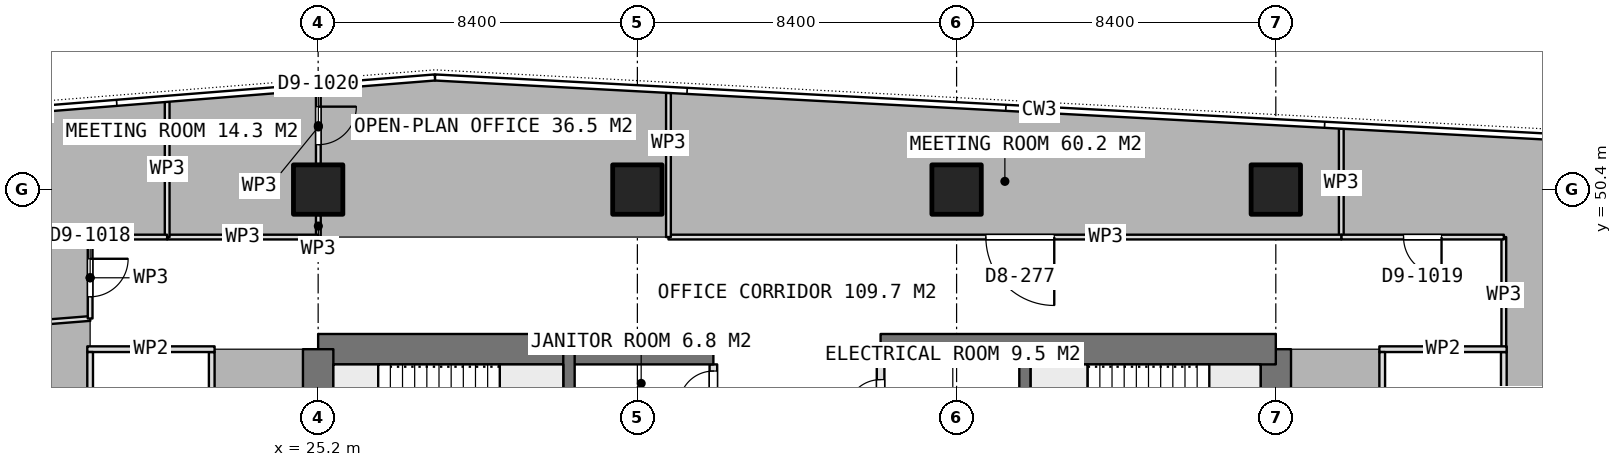
"""IFC4 building model, lengths in metres.
Left out: names, types, materials, properties, quantities, classifications, styles, units other than length and angle.
Written with IfcOpenShell. Run it as: python <this file> out.ifc"""

import sys

from ifc_helpers import new_model, si_unit, direction, frame, frame_2d, origin, origin_2d, place, context, subcontext, project, spatial, rectangle, extrude, element, fill, save


model = new_model("IFC4")
c1 = context("Model", 3, precision=1e-05, world=origin(), true_north=direction((0.0, 1.0)))
c2 = subcontext(c1, "Body", "Model", "MODEL_VIEW")
j1 = project(units=[si_unit("LENGTHUNIT", "METRE"), si_unit("PLANEANGLEUNIT", "RADIAN")], contexts=[c1])
p1 = place(None, origin())
s1 = spatial("IfcSite", under=j1, at=p1, CompositionType="ELEMENT")
p2 = place(p1, origin())
s2 = spatial("IfcBuilding", under=s1, at=p2, CompositionType="ELEMENT")
p3 = place(p2, frame((0.0, 0.0, 272.6)))
s3 = spatial("IfcBuildingStorey", under=s2, at=p3, CompositionType="ELEMENT", Elevation=272.6)
p4 = place(p3, frame((25.2, 46.2, 0.0), z_axis=(0.0, 0.0, 1.0), x_axis=(1.0, 0.0, 0.0)))
e1 = element("IfcWall", 1, at=p4, inside=s3, PredefinedType="SHEAR", context=c2, shape_type="SweptSolid", body=[
    extrude(rectangle(XDim=10.4, YDim=0.8, at=frame_2d((5.2, 0.0))), origin(), (0.0, 0.0, 1.0), 3.75),
])
p5 = place(p3, frame((40.0, 46.2, 0.0), z_axis=(0.0, 0.0, 1.0), x_axis=(1.0, 0.0, 0.0)))
e2 = element("IfcWall", 2, at=p5, inside=s3, PredefinedType="SHEAR", context=c2, shape_type="SweptSolid", body=[
    extrude(rectangle(XDim=10.4, YDim=0.8, at=frame_2d((5.2, 0.0))), origin(), (0.0, 0.0, 1.0), 3.75),
])
p6 = place(p3, frame((25.2, 21.0, 0.0), z_axis=(0.0, 0.0, 1.0), x_axis=(0.0, 1.0, 0.0)))
e3 = element("IfcWall", 3, at=p6, inside=s3, PredefinedType="SHEAR", context=c2, shape_type="SweptSolid", body=[
    extrude(rectangle(XDim=25.2, YDim=0.8, at=frame_2d((12.6, 0.0))), origin(), (0.0, 0.0, 1.0), 3.75),
])
p7 = place(p6, frame((7.8, 0.0, 0.0)))
e4 = element("IfcOpeningElement", 4, at=p7, cuts=e3, PredefinedType="OPENING", context=c2, shape_type="SweptSolid", body=[
    extrude(rectangle(XDim=1.2, YDim=2.1, at=frame_2d((0.6, 1.05))), frame((0.0, 0.41, 0.0), z_axis=(0.0, -1.0, 0.0), x_axis=(1.0, 0.0, 0.0)), (0.0, 0.0, 1.0), 0.82),
])
p8 = place(p6, frame((14.25, 0.0, 0.0)))
e5 = element("IfcOpeningElement", 5, at=p8, cuts=e3, PredefinedType="OPENING", context=c2, shape_type="SweptSolid", body=[
    extrude(rectangle(XDim=0.9, YDim=2.1, at=frame_2d((0.45, 1.05))), frame((0.0, 0.41, 0.0), z_axis=(0.0, -1.0, 0.0), x_axis=(1.0, 0.0, 0.0)), (0.0, 0.0, 1.0), 0.82),
])
p9 = place(p6, frame((16.85, 0.0, 0.0)))
e6 = element("IfcOpeningElement", 6, at=p9, cuts=e3, PredefinedType="OPENING", context=c2, shape_type="SweptSolid", body=[
    extrude(rectangle(XDim=0.9, YDim=2.1, at=frame_2d((0.45, 1.05))), frame((0.0, 0.41, 0.0), z_axis=(0.0, -1.0, 0.0), x_axis=(1.0, 0.0, 0.0)), (0.0, 0.0, 1.0), 0.82),
])
p10 = place(p6, frame((18.95, 0.0, 0.0)))
e7 = element("IfcOpeningElement", 7, at=p10, cuts=e3, PredefinedType="OPENING", context=c2, shape_type="SweptSolid", body=[
    extrude(rectangle(XDim=1.2, YDim=2.1, at=frame_2d((0.6, 1.05))), frame((0.0, 0.41, 0.0), z_axis=(0.0, -1.0, 0.0), x_axis=(1.0, 0.0, 0.0)), (0.0, 0.0, 1.0), 0.82),
])
p11 = place(p3, frame((50.4, 21.0, 0.0), z_axis=(0.0, 0.0, 1.0), x_axis=(0.0, 1.0, 0.0)))
e8 = element("IfcWall", 8, at=p11, inside=s3, PredefinedType="SHEAR", context=c2, shape_type="SweptSolid", body=[
    extrude(rectangle(XDim=25.2, YDim=0.8, at=frame_2d((12.6, 0.0))), origin(), (0.0, 0.0, 1.0), 3.75),
])
p12 = place(p11, frame((16.2, 0.0, 0.0)))
e9 = element("IfcOpeningElement", 9, at=p12, cuts=e8, PredefinedType="OPENING", context=c2, shape_type="SweptSolid", body=[
    extrude(rectangle(XDim=1.2, YDim=2.1, at=frame_2d((0.6, 1.05))), frame((0.0, 0.41, 0.0), z_axis=(0.0, -1.0, 0.0), x_axis=(1.0, 0.0, 0.0)), (0.0, 0.0, 1.0), 0.82),
])
p13 = place(p11, frame((10.05, 0.0, 0.0)))
e10 = element("IfcOpeningElement", 10, at=p13, cuts=e8, PredefinedType="OPENING", context=c2, shape_type="SweptSolid", body=[
    extrude(rectangle(XDim=0.9, YDim=2.1, at=frame_2d((0.45, 1.05))), frame((0.0, 0.41, 0.0), z_axis=(0.0, -1.0, 0.0), x_axis=(1.0, 0.0, 0.0)), (0.0, 0.0, 1.0), 0.82),
])
p14 = place(p11, frame((7.45, 0.0, 0.0)))
e11 = element("IfcOpeningElement", 11, at=p14, cuts=e8, PredefinedType="OPENING", context=c2, shape_type="SweptSolid", body=[
    extrude(rectangle(XDim=0.9, YDim=2.1, at=frame_2d((0.45, 1.05))), frame((0.0, 0.41, 0.0), z_axis=(0.0, -1.0, 0.0), x_axis=(1.0, 0.0, 0.0)), (0.0, 0.0, 1.0), 0.82),
])
p15 = place(p11, frame((0.6, 0.0, 0.0)))
e12 = element("IfcOpeningElement", 12, at=p15, cuts=e8, PredefinedType="OPENING", context=c2, shape_type="SweptSolid", body=[
    extrude(rectangle(XDim=1.2, YDim=2.1, at=frame_2d((0.6, 1.05))), frame((0.0, 0.41, 0.0), z_axis=(0.0, -1.0, 0.0), x_axis=(1.0, 0.0, 0.0)), (0.0, 0.0, 1.0), 0.82),
])
for number, where, z_axis, x_axis in (
    (13, (31.8, 21.0, 0.0), (0.0, 0.0, 1.0), (0.0, 1.0, 0.0)),
    (14, (43.8, 21.0, 0.0), (0.0, 0.0, 1.0), (0.0, 1.0, 0.0)),
):
    element("IfcWall", number, at=place(p3, frame(where, z_axis=z_axis, x_axis=x_axis)), inside=s3, PredefinedType="SHEAR", context=c2, shape_type="SweptSolid", body=[
        extrude(rectangle(XDim=25.2, YDim=0.3, at=frame_2d((12.6, 0.0))), origin(), (0.0, 0.0, 1.0), 3.75),
    ])
for number, where, z_axis, x_axis in (
    (15, (25.2, 50.4, 0.0), (0.0, 0.0, 1.0), (1.0, 0.0, 0.0)),
    (16, (33.6, 50.4, 0.0), (0.0, 0.0, 1.0), (1.0, 0.0, 0.0)),
    (17, (42.0, 50.4, 0.0), (0.0, 0.0, 1.0), (1.0, 0.0, 0.0)),
    (18, (50.4, 50.4, 0.0), (0.0, 0.0, 1.0), (1.0, 0.0, 0.0)),
):
    element("IfcColumn", number, at=place(p3, frame(where, z_axis=z_axis, x_axis=x_axis)), inside=s3, PredefinedType="COLUMN", context=c2, shape_type="SweptSolid", body=[
        extrude(rectangle(XDim=1.3, YDim=1.3, at=origin_2d()), origin(), (0.0, 0.0, 1.0), 3.75),
    ])
p16 = place(p3, frame((40.0, 41.55, 0.0), z_axis=(0.0, 0.0, 1.0), x_axis=(0.0, 1.0, 0.0)))
e19 = element("IfcWall", 19, at=p16, inside=s3, PredefinedType="PARTITIONING", context=c2, shape_type="SweptSolid", body=[
    extrude(rectangle(XDim=4.25, YDim=0.2, at=frame_2d((2.125, 0.0))), origin(), (0.0, 0.0, 1.0), 3.5),
])
p17 = place(p16, frame((2.95, 0.0, 0.0)))
e20 = element("IfcOpeningElement", 20, at=p17, cuts=e19, PredefinedType="OPENING", context=c2, shape_type="SweptSolid", body=[
    extrude(rectangle(XDim=0.9, YDim=2.1, at=frame_2d((0.45, 1.05))), frame((0.0, 0.11, 0.0), z_axis=(0.0, -1.0, 0.0), x_axis=(1.0, 0.0, 0.0)), (0.0, 0.0, 1.0), 0.22),
])
p18 = place(p16, frame((0.5, 0.0, 0.0)))
e21 = element("IfcOpeningElement", 21, at=p18, cuts=e19, PredefinedType="OPENING", context=c2, shape_type="SweptSolid", body=[
    extrude(rectangle(XDim=1.0, YDim=2.1, at=frame_2d((0.5, 1.05))), frame((0.0, 0.11, 0.0), z_axis=(0.0, -1.0, 0.0), x_axis=(1.0, 0.0, 0.0)), (0.0, 0.0, 1.0), 0.22),
])
p19 = place(p3, frame((35.6, 41.55, 0.0), z_axis=(0.0, 0.0, 1.0), x_axis=(0.0, 1.0, 0.0)))
e22 = element("IfcWall", 22, at=p19, inside=s3, PredefinedType="PARTITIONING", context=c2, shape_type="SweptSolid", body=[
    extrude(rectangle(XDim=4.25, YDim=0.2, at=frame_2d((2.125, 0.0))), origin(), (0.0, 0.0, 1.0), 3.5),
])
p20 = place(p19, frame((3.175, 0.0, 0.0)))
e23 = element("IfcOpeningElement", 23, at=p20, cuts=e22, PredefinedType="OPENING", context=c2, shape_type="SweptSolid", body=[
    extrude(rectangle(XDim=0.9, YDim=2.1, at=frame_2d((0.45, 1.05))), frame((0.0, 0.11, 0.0), z_axis=(0.0, -1.0, 0.0), x_axis=(1.0, 0.0, 0.0)), (0.0, 0.0, 1.0), 0.22),
])
p21 = place(p19, frame((0.8, 0.0, 0.0)))
e24 = element("IfcOpeningElement", 24, at=p21, cuts=e22, PredefinedType="OPENING", context=c2, shape_type="SweptSolid", body=[
    extrude(rectangle(XDim=1.1, YDim=2.1, at=frame_2d((0.55, 1.05))), frame((0.0, 0.11, 0.0), z_axis=(0.0, -1.0, 0.0), x_axis=(1.0, 0.0, 0.0)), (0.0, 0.0, 1.0), 0.22),
])
p22 = place(p3, frame((53.125, 46.2, 0.0), z_axis=(0.0, 0.0, 1.0), x_axis=(1.0, 0.0, 0.0)))
e25 = element("IfcWall", 25, at=p22, inside=s3, PredefinedType="PARTITIONING", context=c2, shape_type="SweptSolid", body=[
    extrude(rectangle(XDim=3.35, YDim=0.15, at=frame_2d((1.675, 0.0))), origin(), (0.0, 0.0, 1.0), 3.5),
])
p23 = place(p3, frame((53.2, 39.275, 0.0), z_axis=(0.0, 0.0, 1.0), x_axis=(0.0, 1.0, 0.0)))
e26 = element("IfcWall", 26, at=p23, inside=s3, PredefinedType="PARTITIONING", context=c2, shape_type="SweptSolid", body=[
    extrude(rectangle(XDim=6.85, YDim=0.15, at=frame_2d((3.425, 0.0))), origin(), (0.0, 0.0, 1.0), 3.5),
])
p24 = place(p23, frame((2.925, 0.0, 0.0)))
e27 = element("IfcOpeningElement", 27, at=p24, cuts=e26, PredefinedType="OPENING", context=c2, shape_type="SweptSolid", body=[
    extrude(rectangle(XDim=1.0, YDim=2.1, at=frame_2d((0.5, 1.05))), frame((0.0, 0.085, 0.0), z_axis=(0.0, -1.0, 0.0), x_axis=(1.0, 0.0, 0.0)), (0.0, 0.0, 1.0), 0.17),
])
p25 = place(p3, frame((56.4, 39.275, 0.0), z_axis=(0.0, 0.0, 1.0), x_axis=(0.0, 1.0, 0.0)))
e28 = element("IfcWall", 28, at=p25, inside=s3, PredefinedType="PARTITIONING", context=c2, shape_type="SweptSolid", body=[
    extrude(rectangle(XDim=6.85, YDim=0.15, at=frame_2d((3.425, 0.0))), origin(), (0.0, 0.0, 1.0), 3.5),
])
p26 = place(p3, frame((19.125, 46.2, 0.0), z_axis=(0.0, 0.0, 1.0), x_axis=(1.0, 0.0, 0.0)))
e29 = element("IfcWall", 29, at=p26, inside=s3, PredefinedType="PARTITIONING", context=c2, shape_type="SweptSolid", body=[
    extrude(rectangle(XDim=3.35, YDim=0.15, at=frame_2d((1.675, 0.0))), origin(), (0.0, 0.0, 1.0), 3.5),
])
p27 = place(p3, frame((19.2, 39.275, 0.0), z_axis=(0.0, 0.0, 1.0), x_axis=(0.0, 1.0, 0.0)))
e30 = element("IfcWall", 30, at=p27, inside=s3, PredefinedType="PARTITIONING", context=c2, shape_type="SweptSolid", body=[
    extrude(rectangle(XDim=6.85, YDim=0.15, at=frame_2d((3.425, 0.0))), origin(), (0.0, 0.0, 1.0), 3.5),
])
p28 = place(p3, frame((22.4, 39.275, 0.0), z_axis=(0.0, 0.0, 1.0), x_axis=(0.0, 1.0, 0.0)))
e31 = element("IfcWall", 31, at=p28, inside=s3, PredefinedType="PARTITIONING", context=c2, shape_type="SweptSolid", body=[
    extrude(rectangle(XDim=6.85, YDim=0.15, at=frame_2d((3.425, 0.0))), origin(), (0.0, 0.0, 1.0), 3.5),
])
p29 = place(p28, frame((2.925, 0.0, 0.0)))
e32 = element("IfcOpeningElement", 32, at=p29, cuts=e31, PredefinedType="OPENING", context=c2, shape_type="SweptSolid", body=[
    extrude(rectangle(XDim=1.0, YDim=2.1, at=frame_2d((0.5, 1.05))), frame((0.0, 0.085, 0.0), z_axis=(0.0, -1.0, 0.0), x_axis=(1.0, 0.0, 0.0)), (0.0, 0.0, 1.0), 0.17),
])
p30 = place(p3, frame((52.123, 49.15, 0.0), z_axis=(0.0, 0.0, 1.0), x_axis=(0.0, 1.0, 0.0)))
e33 = element("IfcWall", 33, at=p30, inside=s3, PredefinedType="PARTITIONING", context=c2, shape_type="SweptSolid", body=[
    extrude(rectangle(XDim=2.852, YDim=0.125, at=frame_2d((1.426, 0.0))), origin(), (0.0, 0.0, 1.0), 3.5),
])
p31 = place(p3, frame((56.4, 46.125, 0.0), z_axis=(0.0, 0.0, 1.0), x_axis=(0.0, 1.0, 0.0)))
e34 = element("IfcWall", 34, at=p31, inside=s3, PredefinedType="PARTITIONING", context=c2, shape_type="SweptSolid", body=[
    extrude(rectangle(XDim=3.025, YDim=0.125, at=frame_2d((1.512, 0.0))), origin(), (0.0, 0.0, 1.0), 3.5),
])
p32 = place(p3, frame((56.4, 49.15, 0.0), z_axis=(0.0, 0.0, 1.0), x_axis=(-1.0, 0.0, 0.0)))
e35 = element("IfcWall", 35, at=p32, inside=s3, PredefinedType="PARTITIONING", context=c2, shape_type="SweptSolid", body=[
    extrude(rectangle(XDim=4.277, YDim=0.125, at=frame_2d((2.138, 0.0))), origin(), (0.0, 0.0, 1.0), 3.5),
])
p33 = place(p32, frame((1.639, 0.0, 0.0)))
e36 = element("IfcOpeningElement", 36, at=p33, cuts=e35, PredefinedType="OPENING", context=c2, shape_type="SweptSolid", body=[
    extrude(rectangle(XDim=1.0, YDim=2.1, at=frame_2d((0.5, 1.05))), frame((0.0, 0.073, 0.0), z_axis=(0.0, -1.0, 0.0), x_axis=(1.0, 0.0, 0.0)), (0.0, 0.0, 1.0), 0.145),
])
p34 = place(p3, frame((52.123, 49.15, 0.0), z_axis=(0.0, 0.0, 1.0), x_axis=(-1.0, 0.0, 0.0)))
e37 = element("IfcWall", 37, at=p34, inside=s3, PredefinedType="PARTITIONING", context=c2, shape_type="SweptSolid", body=[
    extrude(rectangle(XDim=17.705, YDim=0.125, at=frame_2d((8.853, 0.0))), origin(), (0.0, 0.0, 1.0), 3.5),
])
p35 = place(p34, frame((7.553, 0.0, 0.0)))
e38 = element("IfcOpeningElement", 38, at=p35, cuts=e37, PredefinedType="OPENING", context=c2, shape_type="SweptSolid", body=[
    extrude(rectangle(XDim=1.8, YDim=2.1, at=frame_2d((0.9, 1.05))), frame((0.0, 0.073, 0.0), z_axis=(0.0, -1.0, 0.0), x_axis=(1.0, 0.0, 0.0)), (0.0, 0.0, 1.0), 0.145),
])
p36 = place(p3, frame((34.418, 49.15, 0.0), z_axis=(0.0, 0.0, 1.0), x_axis=(0.0, 1.0, 0.0)))
e39 = element("IfcWall", 39, at=p36, inside=s3, PredefinedType="PARTITIONING", context=c2, shape_type="SweptSolid", body=[
    extrude(rectangle(XDim=3.793, YDim=0.125, at=frame_2d((1.896, 0.0))), origin(), (0.0, 0.0, 1.0), 3.5),
])
p37 = place(p3, frame((25.205, 53.025, 0.0), z_axis=(0.0, 0.0, 1.0), x_axis=(0.0, -1.0, 0.0)))
e40 = element("IfcWall", 40, at=p37, inside=s3, PredefinedType="PARTITIONING", context=c2, shape_type="SweptSolid", body=[
    extrude(rectangle(XDim=1.955, YDim=0.125, at=frame_2d((0.978, 0.0))), origin(), (0.0, 0.0, 1.0), 3.5),
])
p38 = place(p37, frame((0.443, 0.0, 0.0)))
e41 = element("IfcOpeningElement", 41, at=p38, cuts=e40, PredefinedType="OPENING", context=c2, shape_type="SweptSolid", body=[
    extrude(rectangle(XDim=1.0, YDim=2.1, at=frame_2d((0.5, 1.05))), frame((0.0, 0.073, 0.0), z_axis=(0.0, -1.0, 0.0), x_axis=(1.0, 0.0, 0.0)), (0.0, 0.0, 1.0), 0.145),
])
p39 = place(p3, frame((25.205, 49.73, 0.0), z_axis=(0.0, 0.0, 1.0), x_axis=(0.0, -1.0, 0.0)))
e42 = element("IfcWall", 42, at=p39, inside=s3, PredefinedType="PARTITIONING", context=c2, shape_type="SweptSolid", body=[
    extrude(rectangle(XDim=0.58, YDim=0.125, at=frame_2d((0.29, 0.0))), origin(), (0.0, 0.0, 1.0), 3.5),
])
p40 = place(p3, frame((25.205, 49.15, 0.0), z_axis=(0.0, 0.0, 1.0), x_axis=(-1.0, 0.0, 0.0)))
e43 = element("IfcWall", 43, at=p40, inside=s3, PredefinedType="PARTITIONING", context=c2, shape_type="SweptSolid", body=[
    extrude(rectangle(XDim=3.978, YDim=0.125, at=frame_2d((1.989, 0.0))), origin(), (0.0, 0.0, 1.0), 3.5),
])
p41 = place(p3, frame((21.227, 49.15, 0.0), z_axis=(0.0, 0.0, 1.0), x_axis=(0.0, 1.0, 0.0)))
e44 = element("IfcWall", 44, at=p41, inside=s3, PredefinedType="PARTITIONING", context=c2, shape_type="SweptSolid", body=[
    extrude(rectangle(XDim=3.558, YDim=0.125, at=frame_2d((1.779, 0.0))), origin(), (0.0, 0.0, 1.0), 3.5),
])
p42 = place(p3, frame((19.2, 47.008, 0.0), z_axis=(0.0, 0.0, 1.0), x_axis=(-0.996842300725, -0.079406721921, 0.0)))
e45 = element("IfcWall", 45, at=p42, inside=s3, PredefinedType="PARTITIONING", context=c2, shape_type="SweptSolid", body=[
    extrude(rectangle(XDim=6.02, YDim=0.125, at=frame_2d((3.01, 0.0))), origin(), (0.0, 0.0, 1.0), 3.5),
])
p43 = place(p3, frame((21.226, 49.15, 0.0), z_axis=(0.0, 0.0, 1.0), x_axis=(-1.0, 0.0, 0.0)))
e46 = element("IfcWall", 46, at=p43, inside=s3, PredefinedType="PARTITIONING", context=c2, shape_type="SweptSolid", body=[
    extrude(rectangle(XDim=2.026, YDim=0.125, at=frame_2d((1.013, 0.0))), origin(), (0.0, 0.0, 1.0), 3.5),
])
p44 = place(p3, frame((19.2, 49.15, 0.0), z_axis=(0.0, 0.0, 1.0), x_axis=(0.0, -1.0, 0.0)))
e47 = element("IfcWall", 47, at=p44, inside=s3, PredefinedType="PARTITIONING", context=c2, shape_type="SweptSolid", body=[
    extrude(rectangle(XDim=2.142, YDim=0.125, at=frame_2d((1.071, 0.0))), origin(), (0.0, 0.0, 1.0), 3.5),
])
p45 = place(p44, frame((0.571, 0.0, 0.0)))
e48 = element("IfcOpeningElement", 48, at=p45, cuts=e47, PredefinedType="OPENING", context=c2, shape_type="SweptSolid", body=[
    extrude(rectangle(XDim=1.0, YDim=2.1, at=frame_2d((0.5, 1.05))), frame((0.0, 0.073, 0.0), z_axis=(0.0, -1.0, 0.0), x_axis=(1.0, 0.0, 0.0)), (0.0, 0.0, 1.0), 0.145),
])
p46 = place(p17, origin())
e49 = element("IfcDoor", 49, at=p46, inside=s3, OperationType="SINGLE_SWING_LEFT", PredefinedType="DOOR", context=c2, shape_type="SweptSolid", body=[
    extrude(rectangle(XDim=0.9, YDim=2.1, at=frame_2d((0.45, 1.05))), frame((0.0, 0.025, 0.0), z_axis=(0.0, -1.0, 0.0), x_axis=(1.0, 0.0, 0.0)), (0.0, 0.0, 1.0), 0.05),
])
fill(e20, e49)
p47 = place(p20, origin())
e50 = element("IfcDoor", 50, at=p47, inside=s3, OperationType="SINGLE_SWING_LEFT", PredefinedType="DOOR", context=c2, shape_type="SweptSolid", body=[
    extrude(rectangle(XDim=0.9, YDim=2.1, at=frame_2d((0.45, 1.05))), frame((0.0, 0.025, 0.0), z_axis=(0.0, -1.0, 0.0), x_axis=(1.0, 0.0, 0.0)), (0.0, 0.0, 1.0), 0.05),
])
fill(e23, e50)
p48 = place(p33, origin())
e51 = element("IfcDoor", 51, at=p48, inside=s3, OperationType="SINGLE_SWING_LEFT", PredefinedType="DOOR", context=c2, shape_type="SweptSolid", body=[
    extrude(rectangle(XDim=1.0, YDim=2.1, at=frame_2d((0.5, 1.05))), frame((0.0, 0.025, 0.0), z_axis=(0.0, -1.0, 0.0), x_axis=(1.0, 0.0, 0.0)), (0.0, 0.0, 1.0), 0.05),
])
fill(e36, e51)
p49 = place(p35, origin())
e52 = element("IfcDoor", 52, at=p49, inside=s3, OperationType="DOUBLE_DOOR_SINGLE_SWING", PredefinedType="DOOR", context=c2, shape_type="SweptSolid", body=[
    extrude(rectangle(XDim=1.8, YDim=2.1, at=frame_2d((0.9, 1.05))), frame((0.0, 0.025, 0.0), z_axis=(0.0, -1.0, 0.0), x_axis=(1.0, 0.0, 0.0)), (0.0, 0.0, 1.0), 0.05),
])
fill(e38, e52)
p50 = place(p38, origin())
e53 = element("IfcDoor", 53, at=p50, inside=s3, OperationType="SINGLE_SWING_LEFT", PredefinedType="DOOR", context=c2, shape_type="SweptSolid", body=[
    extrude(rectangle(XDim=1.0, YDim=2.1, at=frame_2d((0.5, 1.05))), frame((0.0, 0.025, 0.0), z_axis=(0.0, -1.0, 0.0), x_axis=(1.0, 0.0, 0.0)), (0.0, 0.0, 1.0), 0.05),
])
fill(e41, e53)
p51 = place(p45, origin())
e54 = element("IfcDoor", 54, at=p51, inside=s3, OperationType="SINGLE_SWING_LEFT", PredefinedType="DOOR", context=c2, shape_type="SweptSolid", body=[
    extrude(rectangle(XDim=1.0, YDim=2.1, at=frame_2d((0.5, 1.05))), frame((0.0, 0.025, 0.0), z_axis=(0.0, -1.0, 0.0), x_axis=(1.0, 0.0, 0.0)), (0.0, 0.0, 1.0), 0.05),
])
fill(e48, e54)
save(model, sys.argv[1])
